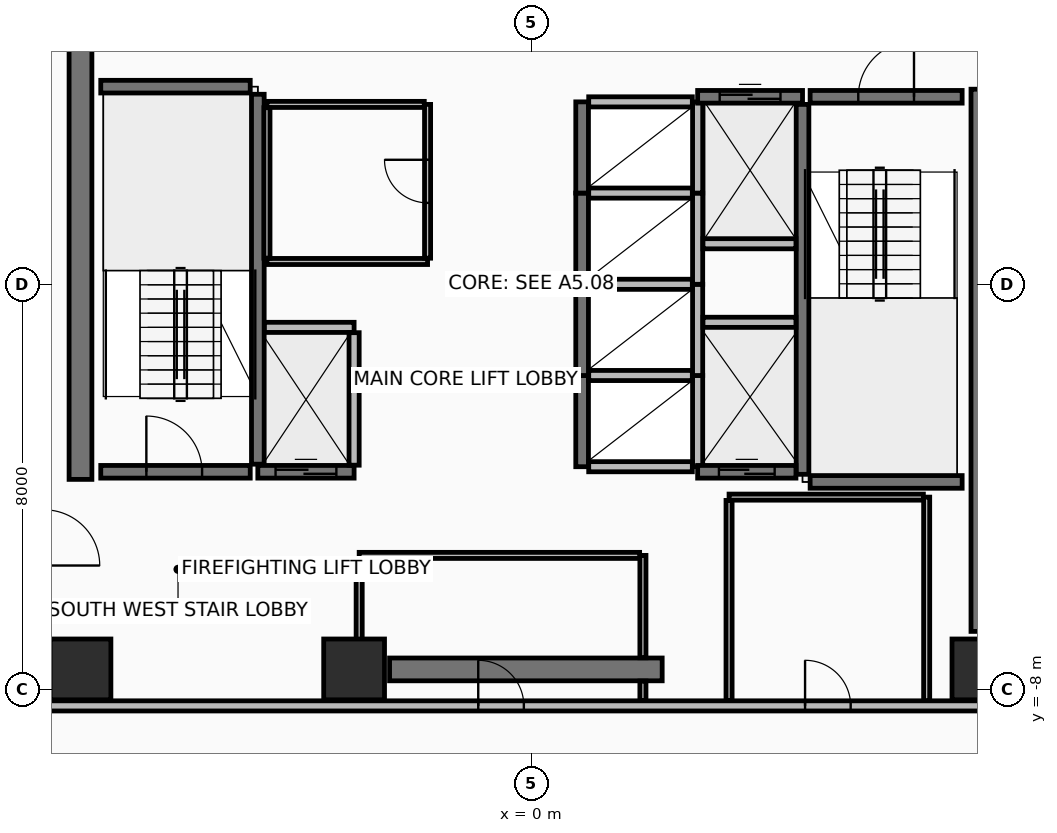
"""IFC4 building model, lengths in metres.
Left out: names, types, materials, properties, quantities, classifications, styles, units other than length and angle.
Written with IfcOpenShell. Run it as: python <this file> out.ifc"""

import sys

from ifc_helpers import new_model, si_unit, direction, frame, frame_2d, origin, origin_2d, place, context, subcontext, project, spatial, rectangle, extrude, element, fill, save


model = new_model("IFC4")
c1 = context("Model", 3, precision=1e-05, world=origin(), true_north=direction((0.0, 1.0)))
c2 = subcontext(c1, "Body", "Model", "MODEL_VIEW")
j1 = project(units=[si_unit("LENGTHUNIT", "METRE"), si_unit("PLANEANGLEUNIT", "RADIAN")], contexts=[c1])
p1 = place(None, origin())
s1 = spatial("IfcSite", under=j1, at=p1, CompositionType="ELEMENT")
p2 = place(p1, origin())
s2 = spatial("IfcBuilding", under=s1, at=p2, CompositionType="ELEMENT")
p3 = place(p2, frame((0.0, 0.0, 153.2)))
s3 = spatial("IfcBuildingStorey", under=s2, at=p3, CompositionType="ELEMENT", Elevation=153.2)
for number, where, z_axis, x_axis in (
    (1, (-8.9, -7.6, 0.0), (0.0, 0.0, 1.0), (1.0, 0.0, 0.0)),
    (2, (-3.5, -7.6, 0.0), (0.0, 0.0, 1.0), (1.0, 0.0, 0.0)),
    (3, (8.9, -7.6, 0.0), (0.0, 0.0, 1.0), (1.0, 0.0, 0.0)),
):
    element("IfcColumn", number, at=place(p3, frame(where, z_axis=z_axis, x_axis=x_axis)), inside=s3, PredefinedType="COLUMN", context=c2, shape_type="SweptSolid", body=[
        extrude(rectangle(XDim=1.2, YDim=1.2, at=origin_2d()), origin(), (0.0, 0.0, 1.0), 3.6),
    ])
p4 = place(p3, frame((-2.8, -7.6, 0.0), z_axis=(0.0, 0.0, 1.0), x_axis=(1.0, 0.0, 0.0)))
e4 = element("IfcWall", 4, at=p4, inside=s3, PredefinedType="SHEAR", context=c2, shape_type="SweptSolid", body=[
    extrude(rectangle(XDim=5.38, YDim=0.45, at=frame_2d((2.69, 0.0))), origin(), (0.0, 0.0, 1.0), 3.41),
])
for number, where, z_axis, x_axis in (
    (5, (-8.9, -3.85, 0.0), (0.0, 0.0, 1.0), (0.0, 1.0, 0.0)),
    (6, (8.9, -6.85, 0.0), (0.0, 0.0, 1.0), (0.0, 1.0, 0.0)),
):
    element("IfcWall", number, at=place(p3, frame(where, z_axis=z_axis, x_axis=x_axis)), inside=s3, PredefinedType="SHEAR", context=c2, shape_type="SweptSolid", body=[
        extrude(rectangle(XDim=10.7, YDim=0.45, at=frame_2d((5.35, 0.0))), origin(), (0.0, 0.0, 1.0), 3.41),
    ])
p5 = place(p3, frame((-9.62, -8.32, 0.0), z_axis=(0.0, 0.0, 1.0), x_axis=(1.0, 0.0, 0.0)))
e7 = element("IfcWall", 7, at=p5, inside=s3, PredefinedType="PARTITIONING", context=c2, shape_type="SweptSolid", body=[
    extrude(rectangle(XDim=19.24, YDim=0.2, at=frame_2d((9.62, 0.0))), origin(), (0.0, 0.0, 1.0), 2.855),
])
p6 = place(p5, frame((8.57, 0.0, 0.0)))
e8 = element("IfcOpeningElement", 8, at=p6, cuts=e7, PredefinedType="OPENING", context=c2, shape_type="SweptSolid", body=[
    extrude(rectangle(XDim=0.9, YDim=2.1, at=frame_2d((0.45, 1.05))), frame((0.0, 0.11, 0.0), z_axis=(0.0, -1.0, 0.0), x_axis=(1.0, 0.0, 0.0)), (0.0, 0.0, 1.0), 0.22),
])
p7 = place(p5, frame((15.02, 0.0, 0.0)))
e9 = element("IfcOpeningElement", 9, at=p7, cuts=e7, PredefinedType="OPENING", context=c2, shape_type="SweptSolid", body=[
    extrude(rectangle(XDim=0.9, YDim=2.1, at=frame_2d((0.45, 1.05))), frame((0.0, 0.11, 0.0), z_axis=(0.0, -1.0, 0.0), x_axis=(1.0, 0.0, 0.0)), (0.0, 0.0, 1.0), 0.22),
])
p8 = place(p3, frame((-5.4, -3.55, 0.0), z_axis=(0.0, 0.0, 1.0), x_axis=(0.0, 1.0, 0.0)))
e10 = element("IfcWall", 10, at=p8, inside=s3, PredefinedType="SHEAR", context=c2, shape_type="SweptSolid", body=[
    extrude(rectangle(XDim=7.3, YDim=0.25, at=frame_2d((3.65, 0.0))), origin(), (0.0, 0.0, 1.0), 3.41),
])
p9 = place(p3, frame((-8.5, -3.7, 0.0), z_axis=(0.0, 0.0, 1.0), x_axis=(1.0, 0.0, 0.0)))
e11 = element("IfcWall", 11, at=p9, inside=s3, PredefinedType="SHEAR", context=c2, shape_type="SweptSolid", body=[
    extrude(rectangle(XDim=2.95, YDim=0.25, at=frame_2d((1.475, 0.0))), origin(), (0.0, 0.0, 1.0), 3.41),
])
p10 = place(p9, frame((0.9, 0.0, 0.0)))
e12 = element("IfcOpeningElement", 12, at=p10, cuts=e11, PredefinedType="OPENING", context=c2, shape_type="SweptSolid", body=[
    extrude(rectangle(XDim=1.1, YDim=2.15, at=frame_2d((0.55, 1.075))), frame((0.0, 0.135, 0.0), z_axis=(0.0, -1.0, 0.0), x_axis=(1.0, 0.0, 0.0)), (0.0, 0.0, 1.0), 0.27),
])
p11 = place(p3, frame((-8.5, 3.9, 0.0), z_axis=(0.0, 0.0, 1.0), x_axis=(1.0, 0.0, 0.0)))
e13 = element("IfcWall", 13, at=p11, inside=s3, PredefinedType="SHEAR", context=c2, shape_type="SweptSolid", body=[
    extrude(rectangle(XDim=2.95, YDim=0.25, at=frame_2d((1.475, 0.0))), origin(), (0.0, 0.0, 1.0), 3.41),
])
p12 = place(p3, frame((5.35, -3.75, 0.0), z_axis=(0.0, 0.0, 1.0), x_axis=(0.0, 1.0, 0.0)))
e14 = element("IfcWall", 14, at=p12, inside=s3, PredefinedType="SHEAR", context=c2, shape_type="SweptSolid", body=[
    extrude(rectangle(XDim=7.3, YDim=0.25, at=frame_2d((3.65, 0.0))), origin(), (0.0, 0.0, 1.0), 3.41),
])
p13 = place(p3, frame((5.5, 3.7, 0.0), z_axis=(0.0, 0.0, 1.0), x_axis=(1.0, 0.0, 0.0)))
e15 = element("IfcWall", 15, at=p13, inside=s3, PredefinedType="SHEAR", context=c2, shape_type="SweptSolid", body=[
    extrude(rectangle(XDim=3.0, YDim=0.25, at=frame_2d((1.5, 0.0))), origin(), (0.0, 0.0, 1.0), 3.41),
])
p14 = place(p13, frame((0.95, 0.0, 0.0)))
e16 = element("IfcOpeningElement", 16, at=p14, cuts=e15, PredefinedType="OPENING", context=c2, shape_type="SweptSolid", body=[
    extrude(rectangle(XDim=1.1, YDim=2.15, at=frame_2d((0.55, 1.075))), frame((0.0, 0.135, 0.0), z_axis=(0.0, -1.0, 0.0), x_axis=(1.0, 0.0, 0.0)), (0.0, 0.0, 1.0), 0.27),
])
p15 = place(p3, frame((5.5, -3.9, 0.0), z_axis=(0.0, 0.0, 1.0), x_axis=(1.0, 0.0, 0.0)))
e17 = element("IfcWall", 17, at=p15, inside=s3, PredefinedType="SHEAR", context=c2, shape_type="SweptSolid", body=[
    extrude(rectangle(XDim=3.0, YDim=0.25, at=frame_2d((1.5, 0.0))), origin(), (0.0, 0.0, 1.0), 3.41),
])
p16 = place(p3, frame((1.0, -3.6, 0.0), z_axis=(0.0, 0.0, 1.0), x_axis=(0.0, 1.0, 0.0)))
e18 = element("IfcWall", 18, at=p16, inside=s3, PredefinedType="SHEAR", context=c2, shape_type="SweptSolid", body=[
    extrude(rectangle(XDim=1.8, YDim=0.25, at=frame_2d((0.9, 0.0))), origin(), (0.0, 0.0, 1.0), 3.41),
])
p17 = place(p3, frame((3.28, -3.6, 0.0), z_axis=(0.0, 0.0, 1.0), x_axis=(0.0, 1.0, 0.0)))
e19 = element("IfcWall", 19, at=p17, inside=s3, PredefinedType="PARTITIONING", context=c2, shape_type="SweptSolid", body=[
    extrude(rectangle(XDim=1.8, YDim=0.2, at=frame_2d((0.9, 0.0))), origin(), (0.0, 0.0, 1.0), 3.41),
])
for number, where, z_axis, x_axis in (
    (20, (1.13, -3.6, 0.0), (0.0, 0.0, 1.0), (1.0, 0.0, 0.0)),
    (21, (1.13, -1.8, 0.0), (0.0, 0.0, 1.0), (1.0, 0.0, 0.0)),
):
    element("IfcWall", number, at=place(p3, frame(where, z_axis=z_axis, x_axis=x_axis)), inside=s3, PredefinedType="PARTITIONING", context=c2, shape_type="SweptSolid", body=[
        extrude(rectangle(XDim=2.045, YDim=0.2, at=frame_2d((1.022, 0.0))), origin(), (0.0, 0.0, 1.0), 3.41),
    ])
p18 = place(p3, frame((1.0, -1.8, 0.0), z_axis=(0.0, 0.0, 1.0), x_axis=(0.0, 1.0, 0.0)))
e22 = element("IfcWall", 22, at=p18, inside=s3, PredefinedType="SHEAR", context=c2, shape_type="SweptSolid", body=[
    extrude(rectangle(XDim=1.8, YDim=0.25, at=frame_2d((0.9, 0.0))), origin(), (0.0, 0.0, 1.0), 3.41),
])
p19 = place(p3, frame((3.28, -1.8, 0.0), z_axis=(0.0, 0.0, 1.0), x_axis=(0.0, 1.0, 0.0)))
e23 = element("IfcWall", 23, at=p19, inside=s3, PredefinedType="PARTITIONING", context=c2, shape_type="SweptSolid", body=[
    extrude(rectangle(XDim=1.8, YDim=0.2, at=frame_2d((0.9, 0.0))), origin(), (0.0, 0.0, 1.0), 3.41),
])
p20 = place(p3, frame((1.13, 0.0, 0.0), z_axis=(0.0, 0.0, 1.0), x_axis=(1.0, 0.0, 0.0)))
e24 = element("IfcWall", 24, at=p20, inside=s3, PredefinedType="PARTITIONING", context=c2, shape_type="SweptSolid", body=[
    extrude(rectangle(XDim=2.045, YDim=0.2, at=frame_2d((1.022, 0.0))), origin(), (0.0, 0.0, 1.0), 3.41),
])
p21 = place(p3, frame((1.0, 0.0, 0.0), z_axis=(0.0, 0.0, 1.0), x_axis=(0.0, 1.0, 0.0)))
e25 = element("IfcWall", 25, at=p21, inside=s3, PredefinedType="SHEAR", context=c2, shape_type="SweptSolid", body=[
    extrude(rectangle(XDim=1.8, YDim=0.25, at=frame_2d((0.9, 0.0))), origin(), (0.0, 0.0, 1.0), 3.41),
])
p22 = place(p3, frame((3.28, 0.0, 0.0), z_axis=(0.0, 0.0, 1.0), x_axis=(0.0, 1.0, 0.0)))
e26 = element("IfcWall", 26, at=p22, inside=s3, PredefinedType="PARTITIONING", context=c2, shape_type="SweptSolid", body=[
    extrude(rectangle(XDim=1.8, YDim=0.2, at=frame_2d((0.9, 0.0))), origin(), (0.0, 0.0, 1.0), 3.41),
])
p23 = place(p3, frame((1.13, 1.8, 0.0), z_axis=(0.0, 0.0, 1.0), x_axis=(1.0, 0.0, 0.0)))
e27 = element("IfcWall", 27, at=p23, inside=s3, PredefinedType="PARTITIONING", context=c2, shape_type="SweptSolid", body=[
    extrude(rectangle(XDim=2.045, YDim=0.2, at=frame_2d((1.022, 0.0))), origin(), (0.0, 0.0, 1.0), 3.41),
])
p24 = place(p3, frame((1.0, 1.8, 0.0), z_axis=(0.0, 0.0, 1.0), x_axis=(0.0, 1.0, 0.0)))
e28 = element("IfcWall", 28, at=p24, inside=s3, PredefinedType="SHEAR", context=c2, shape_type="SweptSolid", body=[
    extrude(rectangle(XDim=1.8, YDim=0.25, at=frame_2d((0.9, 0.0))), origin(), (0.0, 0.0, 1.0), 3.41),
])
p25 = place(p3, frame((3.28, 1.8, 0.0), z_axis=(0.0, 0.0, 1.0), x_axis=(0.0, 1.0, 0.0)))
e29 = element("IfcWall", 29, at=p25, inside=s3, PredefinedType="PARTITIONING", context=c2, shape_type="SweptSolid", body=[
    extrude(rectangle(XDim=1.8, YDim=0.2, at=frame_2d((0.9, 0.0))), origin(), (0.0, 0.0, 1.0), 3.41),
])
p26 = place(p3, frame((1.13, 3.6, 0.0), z_axis=(0.0, 0.0, 1.0), x_axis=(1.0, 0.0, 0.0)))
e30 = element("IfcWall", 30, at=p26, inside=s3, PredefinedType="PARTITIONING", context=c2, shape_type="SweptSolid", body=[
    extrude(rectangle(XDim=2.045, YDim=0.2, at=frame_2d((1.022, 0.0))), origin(), (0.0, 0.0, 1.0), 2.605),
])
p27 = place(p3, frame((-5.4, -3.7, 0.0), z_axis=(0.0, 0.0, 1.0), x_axis=(1.0, 0.0, 0.0)))
e31 = element("IfcWall", 31, at=p27, inside=s3, PredefinedType="SHEAR", context=c2, shape_type="SweptSolid", body=[
    extrude(rectangle(XDim=1.9, YDim=0.25, at=frame_2d((0.95, 0.0))), origin(), (0.0, 0.0, 1.0), 3.41),
])
p28 = place(p27, frame((0.35, 0.0, 0.0)))
e32 = element("IfcOpeningElement", 32, at=p28, cuts=e31, PredefinedType="OPENING", context=c2, shape_type="SweptSolid", body=[
    extrude(rectangle(XDim=1.2, YDim=2.2, at=frame_2d((0.6, 1.1))), frame((0.0, 0.135, 0.0), z_axis=(0.0, -1.0, 0.0), x_axis=(1.0, 0.0, 0.0)), (0.0, 0.0, 1.0), 0.27),
])
p29 = place(p3, frame((-5.27, -0.85, 0.0), z_axis=(0.0, 0.0, 1.0), x_axis=(1.0, 0.0, 0.0)))
e33 = element("IfcWall", 33, at=p29, inside=s3, PredefinedType="PARTITIONING", context=c2, shape_type="SweptSolid", body=[
    extrude(rectangle(XDim=1.77, YDim=0.2, at=frame_2d((0.885, 0.0))), origin(), (0.0, 0.0, 1.0), 3.41),
])
p30 = place(p3, frame((-3.5, -3.57, 0.0), z_axis=(0.0, 0.0, 1.0), x_axis=(0.0, 1.0, 0.0)))
e34 = element("IfcWall", 34, at=p30, inside=s3, PredefinedType="PARTITIONING", context=c2, shape_type="SweptSolid", body=[
    extrude(rectangle(XDim=2.615, YDim=0.2, at=frame_2d((1.308, 0.0))), origin(), (0.0, 0.0, 1.0), 3.41),
])
p31 = place(p3, frame((3.28, 3.7, 0.0), z_axis=(0.0, 0.0, 1.0), x_axis=(1.0, 0.0, 0.0)))
e35 = element("IfcWall", 35, at=p31, inside=s3, PredefinedType="SHEAR", context=c2, shape_type="SweptSolid", body=[
    extrude(rectangle(XDim=2.07, YDim=0.25, at=frame_2d((1.035, 0.0))), origin(), (0.0, 0.0, 1.0), 3.41),
])
p32 = place(p31, frame((0.435, 0.0, 0.0)))
e36 = element("IfcOpeningElement", 36, at=p32, cuts=e35, PredefinedType="OPENING", context=c2, shape_type="SweptSolid", body=[
    extrude(rectangle(XDim=1.2, YDim=2.2, at=frame_2d((0.6, 1.1))), frame((0.0, 0.135, 0.0), z_axis=(0.0, -1.0, 0.0), x_axis=(1.0, 0.0, 0.0)), (0.0, 0.0, 1.0), 0.27),
])
p33 = place(p3, frame((3.385, 0.8, 0.0), z_axis=(0.0, 0.0, 1.0), x_axis=(1.0, 0.0, 0.0)))
e37 = element("IfcWall", 37, at=p33, inside=s3, PredefinedType="PARTITIONING", context=c2, shape_type="SweptSolid", body=[
    extrude(rectangle(XDim=1.835, YDim=0.2, at=frame_2d((0.917, 0.0))), origin(), (0.0, 0.0, 1.0), 3.41),
])
p34 = place(p3, frame((3.28, -3.7, 0.0), z_axis=(0.0, 0.0, 1.0), x_axis=(1.0, 0.0, 0.0)))
e38 = element("IfcWall", 38, at=p34, inside=s3, PredefinedType="SHEAR", context=c2, shape_type="SweptSolid", body=[
    extrude(rectangle(XDim=1.94, YDim=0.25, at=frame_2d((0.97, 0.0))), origin(), (0.0, 0.0, 1.0), 3.41),
])
p35 = place(p34, frame((0.42, 0.0, 0.0)))
e39 = element("IfcOpeningElement", 39, at=p35, cuts=e38, PredefinedType="OPENING", context=c2, shape_type="SweptSolid", body=[
    extrude(rectangle(XDim=1.1, YDim=2.2, at=frame_2d((0.55, 1.1))), frame((0.0, 0.135, 0.0), z_axis=(0.0, -1.0, 0.0), x_axis=(1.0, 0.0, 0.0)), (0.0, 0.0, 1.0), 0.27),
])
p36 = place(p3, frame((3.385, -0.75, 0.0), z_axis=(0.0, 0.0, 1.0), x_axis=(1.0, 0.0, 0.0)))
e40 = element("IfcWall", 40, at=p36, inside=s3, PredefinedType="PARTITIONING", context=c2, shape_type="SweptSolid", body=[
    extrude(rectangle(XDim=1.835, YDim=0.2, at=frame_2d((0.917, 0.0))), origin(), (0.0, 0.0, 1.0), 3.41),
])
p37 = place(p3, frame((-5.22, 0.45, 0.0), z_axis=(0.0, 0.0, 1.0), x_axis=(1.0, 0.0, 0.0)))
e41 = element("IfcWall", 41, at=p37, inside=s3, PredefinedType="PARTITIONING", context=c2, shape_type="SweptSolid", body=[
    extrude(rectangle(XDim=3.17, YDim=0.12, at=frame_2d((1.585, 0.0))), origin(), (0.0, 0.0, 1.0), 3.41),
])
p38 = place(p3, frame((-2.05, 0.515, 0.0), z_axis=(0.0, 0.0, 1.0), x_axis=(0.0, 1.0, 0.0)))
e42 = element("IfcWall", 42, at=p38, inside=s3, PredefinedType="PARTITIONING", context=c2, shape_type="SweptSolid", body=[
    extrude(rectangle(XDim=3.035, YDim=0.12, at=frame_2d((1.518, 0.0))), origin(), (0.0, 0.0, 1.0), 3.41),
])
p39 = place(p38, frame((1.092, 0.0, 0.0)))
e43 = element("IfcOpeningElement", 43, at=p39, cuts=e42, PredefinedType="OPENING", context=c2, shape_type="SweptSolid", body=[
    extrude(rectangle(XDim=0.85, YDim=2.1, at=frame_2d((0.425, 1.05))), frame((0.0, 0.07, 0.0), z_axis=(0.0, -1.0, 0.0), x_axis=(1.0, 0.0, 0.0)), (0.0, 0.0, 1.0), 0.14),
])
p40 = place(p3, frame((-2.115, 3.55, 0.0), z_axis=(0.0, 0.0, 1.0), x_axis=(-1.0, 0.0, 0.0)))
e44 = element("IfcWall", 44, at=p40, inside=s3, PredefinedType="PARTITIONING", context=c2, shape_type="SweptSolid", body=[
    extrude(rectangle(XDim=3.105, YDim=0.12, at=frame_2d((1.552, 0.0))), origin(), (0.0, 0.0, 1.0), 3.41),
])
p41 = place(p3, frame((-5.22, 3.485, 0.0), z_axis=(0.0, 0.0, 1.0), x_axis=(0.0, -1.0, 0.0)))
e45 = element("IfcWall", 45, at=p41, inside=s3, PredefinedType="PARTITIONING", context=c2, shape_type="SweptSolid", body=[
    extrude(rectangle(XDim=2.97, YDim=0.12, at=frame_2d((1.485, 0.0))), origin(), (0.0, 0.0, 1.0), 3.41),
])
p42 = place(p3, frame((2.2, -8.215, 0.0), z_axis=(0.0, 0.0, 1.0), x_axis=(0.0, 1.0, 0.0)))
e46 = element("IfcWall", 46, at=p42, inside=s3, PredefinedType="PARTITIONING", context=c2, shape_type="SweptSolid", body=[
    extrude(rectangle(XDim=0.385, YDim=0.12, at=frame_2d((0.192, 0.0))), origin(), (0.0, 0.0, 1.0), 2.605),
])
p43 = place(p3, frame((2.2, -7.37, 0.0), z_axis=(0.0, 0.0, 1.0), x_axis=(0.0, 1.0, 0.0)))
e47 = element("IfcWall", 47, at=p43, inside=s3, PredefinedType="PARTITIONING", context=c2, shape_type="SweptSolid", body=[
    extrude(rectangle(XDim=2.02, YDim=0.12, at=frame_2d((1.01, 0.0))), origin(), (0.0, 0.0, 1.0), 2.605),
])
p44 = place(p3, frame((2.135, -5.35, 0.0), z_axis=(0.0, 0.0, 1.0), x_axis=(-1.0, 0.0, 0.0)))
e48 = element("IfcWall", 48, at=p44, inside=s3, PredefinedType="PARTITIONING", context=c2, shape_type="SweptSolid", body=[
    extrude(rectangle(XDim=5.535, YDim=0.12, at=frame_2d((2.768, 0.0))), origin(), (0.0, 0.0, 1.0), 2.605),
])
p45 = place(p3, frame((-3.4, -5.415, 0.0), z_axis=(0.0, 0.0, 1.0), x_axis=(0.0, -1.0, 0.0)))
e49 = element("IfcWall", 49, at=p45, inside=s3, PredefinedType="PARTITIONING", context=c2, shape_type="SweptSolid", body=[
    extrude(rectangle(XDim=2.8, YDim=0.12, at=frame_2d((1.4, 0.0))), origin(), (0.0, 0.0, 1.0), 2.605),
])
p46 = place(p3, frame((7.8, -8.215, 0.0), z_axis=(0.0, 0.0, 1.0), x_axis=(0.0, 1.0, 0.0)))
e50 = element("IfcWall", 50, at=p46, inside=s3, PredefinedType="PARTITIONING", context=c2, shape_type="SweptSolid", body=[
    extrude(rectangle(XDim=4.015, YDim=0.12, at=frame_2d((2.008, 0.0))), origin(), (0.0, 0.0, 1.0), 2.605),
])
p47 = place(p3, frame((7.735, -4.2, 0.0), z_axis=(0.0, 0.0, 1.0), x_axis=(-1.0, 0.0, 0.0)))
e51 = element("IfcWall", 51, at=p47, inside=s3, PredefinedType="PARTITIONING", context=c2, shape_type="SweptSolid", body=[
    extrude(rectangle(XDim=3.835, YDim=0.12, at=frame_2d((1.917, 0.0))), origin(), (0.0, 0.0, 1.0), 3.41),
])
p48 = place(p3, frame((3.9, -4.265, 0.0), z_axis=(0.0, 0.0, 1.0), x_axis=(0.0, -1.0, 0.0)))
e52 = element("IfcWall", 52, at=p48, inside=s3, PredefinedType="PARTITIONING", context=c2, shape_type="SweptSolid", body=[
    extrude(rectangle(XDim=3.95, YDim=0.12, at=frame_2d((1.975, 0.0))), origin(), (0.0, 0.0, 1.0), 2.605),
])
p49 = place(p10, origin())
e53 = element("IfcDoor", 53, at=p49, inside=s3, OperationType="SINGLE_SWING_LEFT", PredefinedType="DOOR", context=c2, shape_type="SweptSolid", body=[
    extrude(rectangle(XDim=1.1, YDim=2.15, at=frame_2d((0.55, 1.075))), frame((0.0, 0.025, 0.0), z_axis=(0.0, -1.0, 0.0), x_axis=(1.0, 0.0, 0.0)), (0.0, 0.0, 1.0), 0.05),
])
fill(e12, e53)
p50 = place(p14, frame((1.1, 0.0, 0.0), z_axis=(0.0, 0.0, 1.0), x_axis=(-1.0, 0.0, 0.0)))
e54 = element("IfcDoor", 54, at=p50, inside=s3, OperationType="SINGLE_SWING_LEFT", PredefinedType="DOOR", context=c2, shape_type="SweptSolid", body=[
    extrude(rectangle(XDim=1.1, YDim=2.15, at=frame_2d((0.55, 1.075))), frame((0.0, 0.025, 0.0), z_axis=(0.0, -1.0, 0.0), x_axis=(1.0, 0.0, 0.0)), (0.0, 0.0, 1.0), 0.05),
])
fill(e16, e54)
p51 = place(p28, origin())
e55 = element("IfcDoor", 55, at=p51, inside=s3, OperationType="SLIDING_TO_RIGHT", PredefinedType="DOOR", context=c2, shape_type="SweptSolid", body=[
    extrude(rectangle(XDim=1.2, YDim=2.2, at=frame_2d((0.6, 1.1))), frame((0.0, 0.025, 0.0), z_axis=(0.0, -1.0, 0.0), x_axis=(1.0, 0.0, 0.0)), (0.0, 0.0, 1.0), 0.05),
])
fill(e32, e55)
p52 = place(p32, origin())
e56 = element("IfcDoor", 56, at=p52, inside=s3, OperationType="SLIDING_TO_RIGHT", PredefinedType="DOOR", context=c2, shape_type="SweptSolid", body=[
    extrude(rectangle(XDim=1.2, YDim=2.2, at=frame_2d((0.6, 1.1))), frame((0.0, 0.025, 0.0), z_axis=(0.0, -1.0, 0.0), x_axis=(1.0, 0.0, 0.0)), (0.0, 0.0, 1.0), 0.05),
])
fill(e36, e56)
p53 = place(p35, origin())
e57 = element("IfcDoor", 57, at=p53, inside=s3, OperationType="SLIDING_TO_LEFT", PredefinedType="DOOR", context=c2, shape_type="SweptSolid", body=[
    extrude(rectangle(XDim=1.1, YDim=2.2, at=frame_2d((0.55, 1.1))), frame((0.0, 0.025, 0.0), z_axis=(0.0, -1.0, 0.0), x_axis=(1.0, 0.0, 0.0)), (0.0, 0.0, 1.0), 0.05),
])
fill(e39, e57)
p54 = place(p39, frame((0.85, 0.0, 0.0), z_axis=(0.0, 0.0, 1.0), x_axis=(-1.0, 0.0, 0.0)))
e58 = element("IfcDoor", 58, at=p54, inside=s3, OperationType="SINGLE_SWING_RIGHT", PredefinedType="DOOR", context=c2, shape_type="SweptSolid", body=[
    extrude(rectangle(XDim=0.85, YDim=2.1, at=frame_2d((0.425, 1.05))), frame((0.0, 0.025, 0.0), z_axis=(0.0, -1.0, 0.0), x_axis=(1.0, 0.0, 0.0)), (0.0, 0.0, 1.0), 0.05),
])
fill(e43, e58)
p55 = place(p6, origin())
e59 = element("IfcDoor", 59, at=p55, inside=s3, OperationType="SINGLE_SWING_LEFT", PredefinedType="DOOR", context=c2, shape_type="SweptSolid", body=[
    extrude(rectangle(XDim=0.9, YDim=2.1, at=frame_2d((0.45, 1.05))), frame((0.0, 0.025, 0.0), z_axis=(0.0, -1.0, 0.0), x_axis=(1.0, 0.0, 0.0)), (0.0, 0.0, 1.0), 0.05),
])
fill(e8, e59)
p56 = place(p7, origin())
e60 = element("IfcDoor", 60, at=p56, inside=s3, OperationType="SINGLE_SWING_LEFT", PredefinedType="DOOR", context=c2, shape_type="SweptSolid", body=[
    extrude(rectangle(XDim=0.9, YDim=2.1, at=frame_2d((0.45, 1.05))), frame((0.0, 0.025, 0.0), z_axis=(0.0, -1.0, 0.0), x_axis=(1.0, 0.0, 0.0)), (0.0, 0.0, 1.0), 0.05),
])
fill(e9, e60)
save(model, sys.argv[1])
